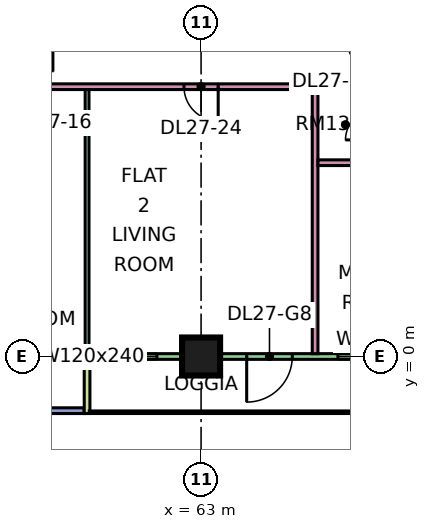
"""IFC4 building model, lengths in metres.
Left out: names, types, materials, properties, quantities, classifications, styles, units other than length and angle.
Written with IfcOpenShell. Run it as: python <this file> out.ifc"""

import sys

from ifc_helpers import new_model, si_unit, direction, frame, frame_2d, origin, origin_2d, place, context, subcontext, project, spatial, rectangle, extrude, element, fill, save


model = new_model("IFC4")
c1 = context("Model", 3, precision=1e-05, world=origin(), true_north=direction((0.0, 1.0)))
c2 = subcontext(c1, "Body", "Model", "MODEL_VIEW")
j1 = project(units=[si_unit("LENGTHUNIT", "METRE"), si_unit("PLANEANGLEUNIT", "RADIAN")], contexts=[c1])
p1 = place(None, origin())
s1 = spatial("IfcSite", under=j1, at=p1, CompositionType="ELEMENT")
p2 = place(p1, origin())
s2 = spatial("IfcBuilding", under=s1, at=p2, CompositionType="ELEMENT")
p3 = place(p2, frame((0.0, 0.0, 118.15)))
s3 = spatial("IfcBuildingStorey", under=s2, at=p3, CompositionType="ELEMENT", Elevation=118.15)
p4 = place(p3, frame((63.0, 0.0, 0.0), z_axis=(0.0, 0.0, 1.0), x_axis=(1.0, 0.0, 0.0)))
e1 = element("IfcColumn", 1, at=p4, inside=s3, PredefinedType="COLUMN", context=c2, shape_type="SweptSolid", body=[
    extrude(rectangle(XDim=1.0, YDim=1.0, at=origin_2d()), origin(), (0.0, 0.0, 1.0), 3.75),
])
p5 = place(p3, frame((48.075, -1.425, 0.0), z_axis=(0.0, 0.0, 1.0), x_axis=(1.0, 0.0, 0.0)))
e2 = element("IfcWall", 2, at=p5, inside=s3, PredefinedType="SOLIDWALL", context=c2, shape_type="SweptSolid", body=[
    extrude(rectangle(XDim=11.85, YDim=0.15, at=frame_2d((5.925, 0.0))), origin(), (0.0, 0.0, 1.0), 3.35),
])
p6 = place(p5, frame((0.562, 0.0, 0.45)))
e3 = element("IfcOpeningElement", 3, at=p6, cuts=e2, PredefinedType="OPENING", context=c2, shape_type="SweptSolid", body=[
    extrude(rectangle(XDim=1.8, YDim=2.4, at=frame_2d((0.9, 1.2))), frame((0.0, 0.085, 0.0), z_axis=(0.0, -1.0, 0.0), x_axis=(1.0, 0.0, 0.0)), (0.0, 0.0, 1.0), 0.17),
])
p7 = place(p5, frame((3.525, 0.0, 0.45)))
e4 = element("IfcOpeningElement", 4, at=p7, cuts=e2, PredefinedType="OPENING", context=c2, shape_type="SweptSolid", body=[
    extrude(rectangle(XDim=1.8, YDim=2.4, at=frame_2d((0.9, 1.2))), frame((0.0, 0.085, 0.0), z_axis=(0.0, -1.0, 0.0), x_axis=(1.0, 0.0, 0.0)), (0.0, 0.0, 1.0), 0.17),
])
p8 = place(p5, frame((7.387, 0.0, 0.45)))
e5 = element("IfcOpeningElement", 5, at=p8, cuts=e2, PredefinedType="OPENING", context=c2, shape_type="SweptSolid", body=[
    extrude(rectangle(XDim=3.0, YDim=2.4, at=frame_2d((1.5, 1.2))), frame((0.0, 0.085, 0.0), z_axis=(0.0, -1.0, 0.0), x_axis=(1.0, 0.0, 0.0)), (0.0, 0.0, 1.0), 0.17),
])
p9 = place(p3, frame((60.075, 0.0, 0.0), z_axis=(0.0, 0.0, 1.0), x_axis=(1.0, 0.0, 0.0)))
e6 = element("IfcWall", 6, at=p9, inside=s3, PredefinedType="SOLIDWALL", context=c2, shape_type="SweptSolid", body=[
    extrude(rectangle(XDim=10.35, YDim=0.15, at=frame_2d((5.175, 0.0))), origin(), (0.0, 0.0, 1.0), 3.35),
])
p10 = place(p9, frame((0.562, 0.0, 0.45)))
e7 = element("IfcOpeningElement", 7, at=p10, cuts=e6, PredefinedType="OPENING", context=c2, shape_type="SweptSolid", body=[
    extrude(rectangle(XDim=1.2, YDim=2.4, at=frame_2d((0.6, 1.2))), frame((0.0, 0.085, 0.0), z_axis=(0.0, -1.0, 0.0), x_axis=(1.0, 0.0, 0.0)), (0.0, 0.0, 1.0), 0.17),
])
p11 = place(p9, frame((4.125, 0.0, 0.0)))
e8 = element("IfcOpeningElement", 8, at=p11, cuts=e6, PredefinedType="OPENING", context=c2, shape_type="SweptSolid", body=[
    extrude(rectangle(XDim=1.2, YDim=2.4, at=frame_2d((0.6, 1.2))), frame((0.0, 0.085, 0.0), z_axis=(0.0, -1.0, 0.0), x_axis=(1.0, 0.0, 0.0)), (0.0, 0.0, 1.0), 0.17),
])
p12 = place(p9, frame((6.525, 0.0, 0.45)))
e9 = element("IfcOpeningElement", 9, at=p12, cuts=e6, PredefinedType="OPENING", context=c2, shape_type="SweptSolid", body=[
    extrude(rectangle(XDim=1.8, YDim=2.4, at=frame_2d((0.9, 1.2))), frame((0.0, 0.085, 0.0), z_axis=(0.0, -1.0, 0.0), x_axis=(1.0, 0.0, 0.0)), (0.0, 0.0, 1.0), 0.17),
])
p13 = place(p9, frame((9.188, 0.0, 0.45)))
e10 = element("IfcOpeningElement", 10, at=p13, cuts=e6, PredefinedType="OPENING", context=c2, shape_type="SweptSolid", body=[
    extrude(rectangle(XDim=0.9, YDim=2.4, at=frame_2d((0.45, 1.2))), frame((0.0, 0.085, 0.0), z_axis=(0.0, -1.0, 0.0), x_axis=(1.0, 0.0, 0.0)), (0.0, 0.0, 1.0), 0.17),
])
p14 = place(p3, frame((60.0, -1.5, 0.0), z_axis=(0.0, 0.0, 1.0), x_axis=(0.0, 1.0, 0.0)))
e11 = element("IfcWall", 11, at=p14, inside=s3, PredefinedType="SOLIDWALL", context=c2, shape_type="SweptSolid", body=[
    extrude(rectangle(XDim=1.5, YDim=0.15, at=frame_2d((0.75, 0.0))), origin(), (0.0, 0.0, 1.0), 3.35),
])
p15 = place(p3, frame((48.1, 7.1, 0.0), z_axis=(0.0, 0.0, 1.0), x_axis=(1.0, 0.0, 0.0)))
e12 = element("IfcWall", 12, at=p15, inside=s3, PredefinedType="PARTITIONING", context=c2, shape_type="SweptSolid", body=[
    extrude(rectangle(XDim=25.25, YDim=0.15, at=frame_2d((12.625, 0.0))), origin(), (0.0, 0.0, 1.0), 3.35),
])
p16 = place(p15, frame((0.95, 0.0, 0.0)))
e13 = element("IfcOpeningElement", 13, at=p16, cuts=e12, PredefinedType="OPENING", context=c2, shape_type="SweptSolid", body=[
    extrude(rectangle(XDim=0.9, YDim=2.1, at=frame_2d((0.45, 1.05))), frame((0.0, 0.085, 0.0), z_axis=(0.0, -1.0, 0.0), x_axis=(1.0, 0.0, 0.0)), (0.0, 0.0, 1.0), 0.17),
])
p17 = place(p15, frame((21.95, 0.0, 0.0)))
e14 = element("IfcOpeningElement", 14, at=p17, cuts=e12, PredefinedType="OPENING", context=c2, shape_type="SweptSolid", body=[
    extrude(rectangle(XDim=0.9, YDim=2.1, at=frame_2d((0.45, 1.05))), frame((0.0, 0.085, 0.0), z_axis=(0.0, -1.0, 0.0), x_axis=(1.0, 0.0, 0.0)), (0.0, 0.0, 1.0), 0.17),
])
p18 = place(p15, frame((9.95, 0.0, 0.0)))
e15 = element("IfcOpeningElement", 15, at=p18, cuts=e12, PredefinedType="OPENING", context=c2, shape_type="SweptSolid", body=[
    extrude(rectangle(XDim=0.9, YDim=2.1, at=frame_2d((0.45, 1.05))), frame((0.0, 0.085, 0.0), z_axis=(0.0, -1.0, 0.0), x_axis=(1.0, 0.0, 0.0)), (0.0, 0.0, 1.0), 0.17),
])
p19 = place(p15, frame((14.45, 0.0, 0.0)))
e16 = element("IfcOpeningElement", 16, at=p19, cuts=e12, PredefinedType="OPENING", context=c2, shape_type="SweptSolid", body=[
    extrude(rectangle(XDim=0.9, YDim=2.1, at=frame_2d((0.45, 1.05))), frame((0.0, 0.085, 0.0), z_axis=(0.0, -1.0, 0.0), x_axis=(1.0, 0.0, 0.0)), (0.0, 0.0, 1.0), 0.17),
])
p20 = place(p15, frame((19.8, 0.0, 0.0)))
e17 = element("IfcOpeningElement", 17, at=p20, cuts=e12, PredefinedType="OPENING", context=c2, shape_type="SweptSolid", body=[
    extrude(rectangle(XDim=0.8, YDim=2.1, at=frame_2d((0.4, 1.05))), frame((0.0, 0.085, 0.0), z_axis=(0.0, -1.0, 0.0), x_axis=(1.0, 0.0, 0.0)), (0.0, 0.0, 1.0), 0.17),
])
p21 = place(p15, frame((3.95, 0.0, 0.0)))
e18 = element("IfcOpeningElement", 18, at=p21, cuts=e12, PredefinedType="OPENING", context=c2, shape_type="SweptSolid", body=[
    extrude(rectangle(XDim=0.9, YDim=2.1, at=frame_2d((0.45, 1.05))), frame((0.0, 0.085, 0.0), z_axis=(0.0, -1.0, 0.0), x_axis=(1.0, 0.0, 0.0)), (0.0, 0.0, 1.0), 0.17),
])
p22 = place(p3, frame((60.0, 0.0, 0.0), z_axis=(0.0, 0.0, 1.0), x_axis=(0.0, 1.0, 0.0)))
e19 = element("IfcWall", 19, at=p22, inside=s3, PredefinedType="PARTITIONING", context=c2, shape_type="SweptSolid", body=[
    extrude(rectangle(XDim=7.025, YDim=0.1, at=frame_2d((3.512, 0.0))), origin(), (0.0, 0.0, 1.0), 3.35),
])
p23 = place(p3, frame((66.0, 0.074, 0.0), z_axis=(0.0, 0.0, 1.0), x_axis=(0.0, 1.0, 0.0)))
e20 = element("IfcWall", 20, at=p23, inside=s3, PredefinedType="PARTITIONING", context=c2, shape_type="SweptSolid", body=[
    extrude(rectangle(XDim=6.951, YDim=0.15, at=frame_2d((3.476, 0.0))), origin(), (0.0, 0.0, 1.0), 3.35),
])
p24 = place(p3, frame((66.075, 5.1, 0.0), z_axis=(0.0, 0.0, 1.0), x_axis=(1.0, 0.0, 0.0)))
e21 = element("IfcWall", 21, at=p24, inside=s3, PredefinedType="PARTITIONING", context=c2, shape_type="SweptSolid", body=[
    extrude(rectangle(XDim=1.45, YDim=0.15, at=frame_2d((0.725, 0.0))), origin(), (0.0, 0.0, 1.0), 3.35),
])
p25 = place(p10, origin())
e22 = element("IfcWindow", 22, at=p25, inside=s3, PartitioningType="SINGLE_PANEL", PredefinedType="WINDOW", context=c2, shape_type="SweptSolid", body=[
    extrude(rectangle(XDim=1.2, YDim=2.4, at=frame_2d((0.6, 1.2))), frame((0.0, 0.03, 0.0), z_axis=(0.0, -1.0, 0.0), x_axis=(1.0, 0.0, 0.0)), (0.0, 0.0, 1.0), 0.06),
])
fill(e7, e22)
p26 = place(p11, frame((1.2, 0.0, 0.0), z_axis=(0.0, 0.0, 1.0), x_axis=(-1.0, 0.0, 0.0)))
e23 = element("IfcDoor", 23, at=p26, inside=s3, OperationType="DOUBLE_DOOR_SINGLE_SWING", PredefinedType="DOOR", context=c2, shape_type="SweptSolid", body=[
    extrude(rectangle(XDim=1.2, YDim=2.4, at=frame_2d((0.6, 1.2))), frame((0.0, 0.025, 0.0), z_axis=(0.0, -1.0, 0.0), x_axis=(1.0, 0.0, 0.0)), (0.0, 0.0, 1.0), 0.05),
])
fill(e8, e23)
p27 = place(p12, origin())
e24 = element("IfcWindow", 24, at=p27, inside=s3, PartitioningType="SINGLE_PANEL", PredefinedType="WINDOW", context=c2, shape_type="SweptSolid", body=[
    extrude(rectangle(XDim=1.8, YDim=2.4, at=frame_2d((0.9, 1.2))), frame((0.0, 0.03, 0.0), z_axis=(0.0, -1.0, 0.0), x_axis=(1.0, 0.0, 0.0)), (0.0, 0.0, 1.0), 0.06),
])
fill(e9, e24)
p28 = place(p19, origin())
e25 = element("IfcDoor", 25, at=p28, inside=s3, OperationType="SINGLE_SWING_RIGHT", PredefinedType="DOOR", context=c2, shape_type="SweptSolid", body=[
    extrude(rectangle(XDim=0.9, YDim=2.1, at=frame_2d((0.45, 1.05))), frame((0.0, 0.025, 0.0), z_axis=(0.0, -1.0, 0.0), x_axis=(1.0, 0.0, 0.0)), (0.0, 0.0, 1.0), 0.05),
])
fill(e16, e25)
save(model, sys.argv[1])
